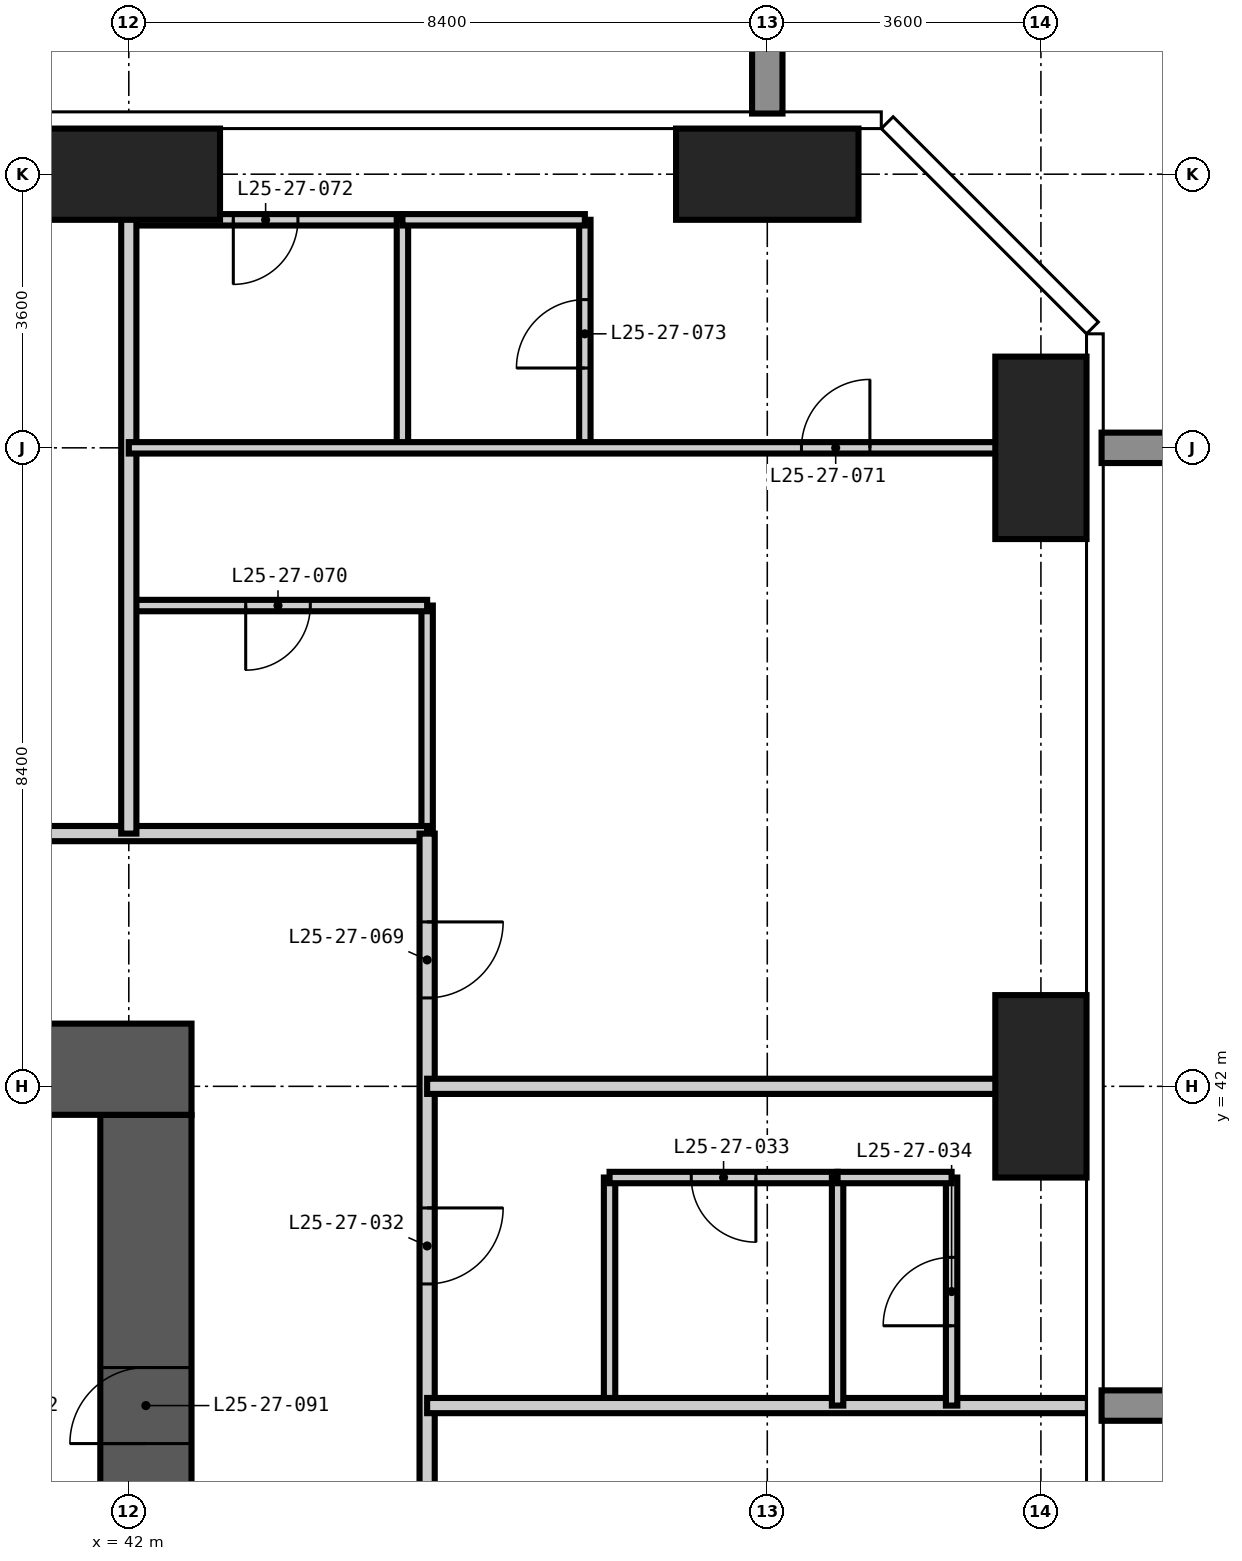
"""IFC4 building model, lengths in metres.
Left out: names, types, materials, properties, quantities, classifications, styles, units other than length and angle.
Written with IfcOpenShell. Run it as: python <this file> out.ifc"""

import sys

from ifc_helpers import new_model, si_unit, direction, frame, frame_2d, origin, origin_2d, place, context, subcontext, project, spatial, rectangle, extrude, element, fill, save


model = new_model("IFC4")
c1 = context("Model", 3, precision=1e-05, world=origin(), true_north=direction((0.0, 1.0)))
c2 = subcontext(c1, "Body", "Model", "MODEL_VIEW")
j1 = project(units=[si_unit("LENGTHUNIT", "METRE"), si_unit("PLANEANGLEUNIT", "RADIAN")], contexts=[c1])
p1 = place(None, origin())
s1 = spatial("IfcSite", under=j1, at=p1, CompositionType="ELEMENT")
p2 = place(p1, origin())
s2 = spatial("IfcBuilding", under=s1, at=p2, CompositionType="ELEMENT")
p3 = place(p2, frame((0.0, 0.0, 100.8)))
s3 = spatial("IfcBuildingStorey", under=s2, at=p3, CompositionType="ELEMENT", Elevation=100.8)
for number, where, z_axis, x_axis in (
    (1, (42.0, 54.0, -0.35), (0.0, 0.0, 1.0), (1.0, 0.0, 0.0)),
    (2, (50.4, 54.0, -0.35), (0.0, 0.0, 1.0), (1.0, 0.0, 0.0)),
):
    element("IfcColumn", number, at=place(p3, frame(where, z_axis=z_axis, x_axis=x_axis)), inside=s3, PredefinedType="COLUMN", context=c2, shape_type="SweptSolid", body=[
        extrude(rectangle(XDim=2.4, YDim=1.2, at=origin_2d()), origin(), (0.0, 0.0, 1.0), 3.6),
    ])
for number, where, z_axis, x_axis in (
    (3, (54.0, 42.0, -0.35), (0.0, 0.0, 1.0), (1.0, 0.0, 0.0)),
    (4, (54.0, 50.4, -0.35), (0.0, 0.0, 1.0), (1.0, 0.0, 0.0)),
):
    element("IfcColumn", number, at=place(p3, frame(where, z_axis=z_axis, x_axis=x_axis)), inside=s3, PredefinedType="COLUMN", context=c2, shape_type="SweptSolid", body=[
        extrude(rectangle(XDim=1.2, YDim=2.4, at=origin_2d()), origin(), (0.0, 0.0, 1.0), 3.6),
    ])
p4 = place(p3, frame((42.225, 17.175, -0.35), z_axis=(0.0, 0.0, 1.0), x_axis=(0.0, 1.0, 0.0)))
e5 = element("IfcWall", 5, at=p4, inside=s3, PredefinedType="SHEAR", context=c2, shape_type="SweptSolid", body=[
    extrude(rectangle(XDim=24.45, YDim=1.2, at=frame_2d((12.225, 0.0))), origin(), (0.0, 0.0, 1.0), 3.6),
])
p5 = place(p4, frame((0.425, 0.0, 0.35)))
e6 = element("IfcOpeningElement", 6, at=p5, cuts=e5, PredefinedType="OPENING", context=c2, shape_type="SweptSolid", body=[
    extrude(rectangle(XDim=1.2, YDim=2.2, at=frame_2d((0.6, 1.1))), frame((0.0, 0.61, 0.0), z_axis=(0.0, -1.0, 0.0), x_axis=(1.0, 0.0, 0.0)), (0.0, 0.0, 1.0), 1.22),
])
p6 = place(p4, frame((11.325, 0.0, 0.35)))
e7 = element("IfcOpeningElement", 7, at=p6, cuts=e5, PredefinedType="OPENING", context=c2, shape_type="SweptSolid", body=[
    extrude(rectangle(XDim=1.8, YDim=2.2, at=frame_2d((0.9, 1.1))), frame((0.0, 0.61, 0.0), z_axis=(0.0, -1.0, 0.0), x_axis=(1.0, 0.0, 0.0)), (0.0, 0.0, 1.0), 1.22),
])
p7 = place(p4, frame((20.125, 0.0, 0.35)))
e8 = element("IfcOpeningElement", 8, at=p7, cuts=e5, PredefinedType="OPENING", context=c2, shape_type="SweptSolid", body=[
    extrude(rectangle(XDim=1.0, YDim=2.1, at=frame_2d((0.5, 1.05))), frame((0.0, 0.61, 0.0), z_axis=(0.0, -1.0, 0.0), x_axis=(1.0, 0.0, 0.0)), (0.0, 0.0, 1.0), 1.22),
])
p8 = place(p3, frame((42.825, 42.225, -0.35), z_axis=(0.0, 0.0, 1.0), x_axis=(-1.0, 0.0, 0.0)))
e9 = element("IfcWall", 9, at=p8, inside=s3, PredefinedType="SHEAR", context=c2, shape_type="SweptSolid", body=[
    extrude(rectangle(XDim=26.85, YDim=1.2, at=frame_2d((13.425, 0.0))), origin(), (0.0, 0.0, 1.0), 3.6),
])
p9 = place(p8, frame((21.325, 0.0, 0.35)))
e10 = element("IfcOpeningElement", 10, at=p9, cuts=e9, PredefinedType="OPENING", context=c2, shape_type="SweptSolid", body=[
    extrude(rectangle(XDim=1.0, YDim=2.1, at=frame_2d((0.5, 1.05))), frame((0.0, 0.61, 0.0), z_axis=(0.0, -1.0, 0.0), x_axis=(1.0, 0.0, 0.0)), (0.0, 0.0, 1.0), 1.22),
])
p10 = place(p8, frame((10.725, 0.0, 0.35)))
e11 = element("IfcOpeningElement", 11, at=p10, cuts=e9, PredefinedType="OPENING", context=c2, shape_type="SweptSolid", body=[
    extrude(rectangle(XDim=1.2, YDim=2.2, at=frame_2d((0.6, 1.1))), frame((0.0, 0.61, 0.0), z_axis=(0.0, -1.0, 0.0), x_axis=(1.0, 0.0, 0.0)), (0.0, 0.0, 1.0), 1.22),
])
for number, where, z_axis, x_axis in (
    (12, (45.925, 45.325, 0.0), (0.0, 0.0, 1.0), (0.0, 1.0, 0.0)),
    (13, (48.325, 37.8, 0.0), (0.0, 0.0, 1.0), (0.0, 1.0, 0.0)),
):
    element("IfcWall", number, at=place(p3, frame(where, z_axis=z_axis, x_axis=x_axis)), inside=s3, PredefinedType="PARTITIONING", context=c2, shape_type="SweptSolid", body=[
        extrude(rectangle(XDim=3.0, YDim=0.15, at=frame_2d((1.5, 0.0))), origin(), (0.0, 0.0, 1.0), 3.25),
    ])
p11 = place(p3, frame((48.325, 40.8, 0.0), z_axis=(0.0, 0.0, 1.0), x_axis=(1.0, 0.0, 0.0)))
e14 = element("IfcWall", 14, at=p11, inside=s3, PredefinedType="PARTITIONING", context=c2, shape_type="SweptSolid", body=[
    extrude(rectangle(XDim=3.0, YDim=0.15, at=frame_2d((1.5, 0.0))), origin(), (0.0, 0.0, 1.0), 3.25),
])
p12 = place(p11, frame((1.075, 0.0, 0.0)))
e15 = element("IfcOpeningElement", 15, at=p12, cuts=e14, PredefinedType="OPENING", context=c2, shape_type="SweptSolid", body=[
    extrude(rectangle(XDim=0.85, YDim=2.1, at=frame_2d((0.425, 1.05))), frame((0.0, 0.085, 0.0), z_axis=(0.0, -1.0, 0.0), x_axis=(1.0, 0.0, 0.0)), (0.0, 0.0, 1.0), 0.17),
])
p13 = place(p3, frame((42.0, 48.325, 0.0), z_axis=(0.0, 0.0, 1.0), x_axis=(1.0, 0.0, 0.0)))
e16 = element("IfcWall", 16, at=p13, inside=s3, PredefinedType="PARTITIONING", context=c2, shape_type="SweptSolid", body=[
    extrude(rectangle(XDim=3.925, YDim=0.15, at=frame_2d((1.962, 0.0))), origin(), (0.0, 0.0, 1.0), 3.25),
])
p14 = place(p13, frame((1.538, 0.0, 0.0)))
e17 = element("IfcOpeningElement", 17, at=p14, cuts=e16, PredefinedType="OPENING", context=c2, shape_type="SweptSolid", body=[
    extrude(rectangle(XDim=0.85, YDim=2.1, at=frame_2d((0.425, 1.05))), frame((0.0, 0.085, 0.0), z_axis=(0.0, -1.0, 0.0), x_axis=(1.0, 0.0, 0.0)), (0.0, 0.0, 1.0), 0.17),
])
p15 = place(p3, frame((42.0, 53.4, 0.0), z_axis=(0.0, 0.0, 1.0), x_axis=(1.0, 0.0, 0.0)))
e18 = element("IfcWall", 18, at=p15, inside=s3, PredefinedType="PARTITIONING", context=c2, shape_type="SweptSolid", body=[
    extrude(rectangle(XDim=3.6, YDim=0.15, at=frame_2d((1.8, 0.0))), origin(), (0.0, 0.0, 1.0), 3.25),
])
p16 = place(p15, frame((1.375, 0.0, 0.0)))
e19 = element("IfcOpeningElement", 19, at=p16, cuts=e18, PredefinedType="OPENING", context=c2, shape_type="SweptSolid", body=[
    extrude(rectangle(XDim=0.85, YDim=2.1, at=frame_2d((0.425, 1.05))), frame((0.0, 0.085, 0.0), z_axis=(0.0, -1.0, 0.0), x_axis=(1.0, 0.0, 0.0)), (0.0, 0.0, 1.0), 0.17),
])
p17 = place(p3, frame((12.6, 45.325, 0.0), z_axis=(0.0, 0.0, 1.0), x_axis=(1.0, 0.0, 0.0)))
e20 = element("IfcWall", 20, at=p17, inside=s3, PredefinedType="PARTITIONING", context=c2, shape_type="SweptSolid", body=[
    extrude(rectangle(XDim=33.325, YDim=0.2, at=frame_2d((16.663, 0.0))), origin(), (0.0, 0.0, 1.0), 3.25),
])
p18 = place(p17, frame((7.9, 0.0, 0.0)))
e21 = element("IfcOpeningElement", 21, at=p18, cuts=e20, PredefinedType="OPENING", context=c2, shape_type="SweptSolid", body=[
    extrude(rectangle(XDim=1.0, YDim=2.2, at=frame_2d((0.5, 1.1))), frame((0.0, 0.11, 0.0), z_axis=(0.0, -1.0, 0.0), x_axis=(1.0, 0.0, 0.0)), (0.0, 0.0, 1.0), 0.22),
])
p19 = place(p17, frame((16.3, 0.0, 0.0)))
e22 = element("IfcOpeningElement", 22, at=p19, cuts=e20, PredefinedType="OPENING", context=c2, shape_type="SweptSolid", body=[
    extrude(rectangle(XDim=1.0, YDim=2.2, at=frame_2d((0.5, 1.1))), frame((0.0, 0.11, 0.0), z_axis=(0.0, -1.0, 0.0), x_axis=(1.0, 0.0, 0.0)), (0.0, 0.0, 1.0), 0.22),
])
p20 = place(p17, frame((24.7, 0.0, 0.0)))
e23 = element("IfcOpeningElement", 23, at=p20, cuts=e20, PredefinedType="OPENING", context=c2, shape_type="SweptSolid", body=[
    extrude(rectangle(XDim=1.0, YDim=2.2, at=frame_2d((0.5, 1.1))), frame((0.0, 0.11, 0.0), z_axis=(0.0, -1.0, 0.0), x_axis=(1.0, 0.0, 0.0)), (0.0, 0.0, 1.0), 0.22),
])
p21 = place(p3, frame((45.925, 45.325, 0.0), z_axis=(0.0, 0.0, 1.0), x_axis=(0.0, -1.0, 0.0)))
e24 = element("IfcWall", 24, at=p21, inside=s3, PredefinedType="PARTITIONING", context=c2, shape_type="SweptSolid", body=[
    extrude(rectangle(XDim=31.25, YDim=0.2, at=frame_2d((15.625, 0.0))), origin(), (0.0, 0.0, 1.0), 3.25),
])
p22 = place(p21, frame((25.925, 0.0, 0.0)))
e25 = element("IfcOpeningElement", 25, at=p22, cuts=e24, PredefinedType="OPENING", context=c2, shape_type="SweptSolid", body=[
    extrude(rectangle(XDim=1.0, YDim=2.2, at=frame_2d((0.5, 1.1))), frame((0.0, 0.11, 0.0), z_axis=(0.0, -1.0, 0.0), x_axis=(1.0, 0.0, 0.0)), (0.0, 0.0, 1.0), 0.22),
])
p23 = place(p21, frame((19.625, 0.0, 0.0)))
e26 = element("IfcOpeningElement", 26, at=p23, cuts=e24, PredefinedType="OPENING", context=c2, shape_type="SweptSolid", body=[
    extrude(rectangle(XDim=1.0, YDim=2.2, at=frame_2d((0.5, 1.1))), frame((0.0, 0.11, 0.0), z_axis=(0.0, -1.0, 0.0), x_axis=(1.0, 0.0, 0.0)), (0.0, 0.0, 1.0), 0.22),
])
p24 = place(p21, frame((11.225, 0.0, 0.0)))
e27 = element("IfcOpeningElement", 27, at=p24, cuts=e24, PredefinedType="OPENING", context=c2, shape_type="SweptSolid", body=[
    extrude(rectangle(XDim=1.0, YDim=2.2, at=frame_2d((0.5, 1.1))), frame((0.0, 0.11, 0.0), z_axis=(0.0, -1.0, 0.0), x_axis=(1.0, 0.0, 0.0)), (0.0, 0.0, 1.0), 0.22),
])
p25 = place(p21, frame((4.925, 0.0, 0.0)))
e28 = element("IfcOpeningElement", 28, at=p25, cuts=e24, PredefinedType="OPENING", context=c2, shape_type="SweptSolid", body=[
    extrude(rectangle(XDim=1.0, YDim=2.2, at=frame_2d((0.5, 1.1))), frame((0.0, 0.11, 0.0), z_axis=(0.0, -1.0, 0.0), x_axis=(1.0, 0.0, 0.0)), (0.0, 0.0, 1.0), 0.22),
])
p26 = place(p21, frame((29.387, 0.0, 0.0)))
e29 = element("IfcOpeningElement", 29, at=p26, cuts=e24, PredefinedType="OPENING", context=c2, shape_type="SweptSolid", body=[
    extrude(rectangle(XDim=1.0, YDim=2.2, at=frame_2d((0.5, 1.1))), frame((0.0, 0.11, 0.0), z_axis=(0.0, -1.0, 0.0), x_axis=(1.0, 0.0, 0.0)), (0.0, 0.0, 1.0), 0.22),
])
p27 = place(p21, frame((1.162, 0.0, 0.0)))
e30 = element("IfcOpeningElement", 30, at=p27, cuts=e24, PredefinedType="OPENING", context=c2, shape_type="SweptSolid", body=[
    extrude(rectangle(XDim=1.0, YDim=2.2, at=frame_2d((0.5, 1.1))), frame((0.0, 0.11, 0.0), z_axis=(0.0, -1.0, 0.0), x_axis=(1.0, 0.0, 0.0)), (0.0, 0.0, 1.0), 0.22),
])
p28 = place(p3, frame((42.0, 45.325, 0.0), z_axis=(0.0, 0.0, 1.0), x_axis=(0.0, 1.0, 0.0)))
e31 = element("IfcWall", 31, at=p28, inside=s3, PredefinedType="PARTITIONING", context=c2, shape_type="SweptSolid", body=[
    extrude(rectangle(XDim=9.293, YDim=0.2, at=frame_2d((4.646, 0.0))), origin(), (0.0, 0.0, 1.0), 3.25),
])
for number, where, z_axis, x_axis in (
    (32, (45.925, 37.8, 0.0), (0.0, 0.0, 1.0), (1.0, 0.0, 0.0)),
    (33, (45.925, 42.0, 0.0), (0.0, 0.0, 1.0), (1.0, 0.0, 0.0)),
):
    element("IfcWall", number, at=place(p3, frame(where, z_axis=z_axis, x_axis=x_axis)), inside=s3, PredefinedType="PARTITIONING", context=c2, shape_type="SweptSolid", body=[
        extrude(rectangle(XDim=8.693, YDim=0.2, at=frame_2d((4.346, 0.0))), origin(), (0.0, 0.0, 1.0), 3.25),
    ])
p29 = place(p3, frame((45.6, 50.4, 0.0), z_axis=(0.0, 0.0, 1.0), x_axis=(0.0, 1.0, 0.0)))
e34 = element("IfcWall", 34, at=p29, inside=s3, PredefinedType="PARTITIONING", context=c2, shape_type="SweptSolid", body=[
    extrude(rectangle(XDim=3.0, YDim=0.15, at=frame_2d((1.5, 0.0))), origin(), (0.0, 0.0, 1.0), 3.25),
])
p30 = place(p3, frame((48.0, 50.4, 0.0), z_axis=(0.0, 0.0, 1.0), x_axis=(0.0, 1.0, 0.0)))
e35 = element("IfcWall", 35, at=p30, inside=s3, PredefinedType="PARTITIONING", context=c2, shape_type="SweptSolid", body=[
    extrude(rectangle(XDim=3.0, YDim=0.15, at=frame_2d((1.5, 0.0))), origin(), (0.0, 0.0, 1.0), 3.25),
])
p31 = place(p30, frame((1.05, 0.0, 0.0)))
e36 = element("IfcOpeningElement", 36, at=p31, cuts=e35, PredefinedType="OPENING", context=c2, shape_type="SweptSolid", body=[
    extrude(rectangle(XDim=0.9, YDim=2.1, at=frame_2d((0.45, 1.05))), frame((0.0, 0.085, 0.0), z_axis=(0.0, -1.0, 0.0), x_axis=(1.0, 0.0, 0.0)), (0.0, 0.0, 1.0), 0.17),
])
p32 = place(p3, frame((51.325, 37.8, 0.0), z_axis=(0.0, 0.0, 1.0), x_axis=(0.0, 1.0, 0.0)))
e37 = element("IfcWall", 37, at=p32, inside=s3, PredefinedType="PARTITIONING", context=c2, shape_type="SweptSolid", body=[
    extrude(rectangle(XDim=3.0, YDim=0.15, at=frame_2d((1.5, 0.0))), origin(), (0.0, 0.0, 1.0), 3.25),
])
p33 = place(p3, frame((52.825, 37.8, 0.0), z_axis=(0.0, 0.0, 1.0), x_axis=(0.0, 1.0, 0.0)))
e38 = element("IfcWall", 38, at=p33, inside=s3, PredefinedType="PARTITIONING", context=c2, shape_type="SweptSolid", body=[
    extrude(rectangle(XDim=3.0, YDim=0.15, at=frame_2d((1.5, 0.0))), origin(), (0.0, 0.0, 1.0), 3.25),
])
p34 = place(p33, frame((1.05, 0.0, 0.0)))
e39 = element("IfcOpeningElement", 39, at=p34, cuts=e38, PredefinedType="OPENING", context=c2, shape_type="SweptSolid", body=[
    extrude(rectangle(XDim=0.9, YDim=2.1, at=frame_2d((0.45, 1.05))), frame((0.0, 0.085, 0.0), z_axis=(0.0, -1.0, 0.0), x_axis=(1.0, 0.0, 0.0)), (0.0, 0.0, 1.0), 0.17),
])
p35 = place(p3, frame((51.325, 40.8, 0.0), z_axis=(0.0, 0.0, 1.0), x_axis=(1.0, 0.0, 0.0)))
e40 = element("IfcWall", 40, at=p35, inside=s3, PredefinedType="PARTITIONING", context=c2, shape_type="SweptSolid", body=[
    extrude(rectangle(XDim=1.5, YDim=0.15, at=frame_2d((0.75, 0.0))), origin(), (0.0, 0.0, 1.0), 3.25),
])
p36 = place(p3, frame((42.0, 50.4, 0.0), z_axis=(0.0, 0.0, 1.0), x_axis=(1.0, 0.0, 0.0)))
e41 = element("IfcWall", 41, at=p36, inside=s3, PredefinedType="PARTITIONING", context=c2, shape_type="SweptSolid", body=[
    extrude(rectangle(XDim=12.618, YDim=0.15, at=frame_2d((6.309, 0.0))), origin(), (0.0, 0.0, 1.0), 3.25),
])
p37 = place(p36, frame((8.85, 0.0, 0.0)))
e42 = element("IfcOpeningElement", 42, at=p37, cuts=e41, PredefinedType="OPENING", context=c2, shape_type="SweptSolid", body=[
    extrude(rectangle(XDim=0.9, YDim=2.1, at=frame_2d((0.45, 1.05))), frame((0.0, 0.085, 0.0), z_axis=(0.0, -1.0, 0.0), x_axis=(1.0, 0.0, 0.0)), (0.0, 0.0, 1.0), 0.17),
])
p38 = place(p3, frame((45.6, 53.4, 0.0), z_axis=(0.0, 0.0, 1.0), x_axis=(1.0, 0.0, 0.0)))
e43 = element("IfcWall", 43, at=p38, inside=s3, PredefinedType="PARTITIONING", context=c2, shape_type="SweptSolid", body=[
    extrude(rectangle(XDim=2.4, YDim=0.15, at=frame_2d((1.2, 0.0))), origin(), (0.0, 0.0, 1.0), 3.25),
])
p39 = place(p25, origin())
e44 = element("IfcDoor", 44, at=p39, inside=s3, OperationType="SINGLE_SWING_LEFT", PredefinedType="DOOR", context=c2, shape_type="SweptSolid", body=[
    extrude(rectangle(XDim=1.0, YDim=2.2, at=frame_2d((0.5, 1.1))), frame((0.0, 0.025, 0.0), z_axis=(0.0, -1.0, 0.0), x_axis=(1.0, 0.0, 0.0)), (0.0, 0.0, 1.0), 0.05),
])
fill(e28, e44)
p40 = place(p12, frame((0.85, 0.0, 0.0), z_axis=(0.0, 0.0, 1.0), x_axis=(-1.0, 0.0, 0.0)))
e45 = element("IfcDoor", 45, at=p40, inside=s3, OperationType="SINGLE_SWING_LEFT", PredefinedType="DOOR", context=c2, shape_type="SweptSolid", body=[
    extrude(rectangle(XDim=0.85, YDim=2.1, at=frame_2d((0.425, 1.05))), frame((0.0, 0.025, 0.0), z_axis=(0.0, -1.0, 0.0), x_axis=(1.0, 0.0, 0.0)), (0.0, 0.0, 1.0), 0.05),
])
fill(e15, e45)
p41 = place(p34, origin())
e46 = element("IfcDoor", 46, at=p41, inside=s3, OperationType="SINGLE_SWING_LEFT", PredefinedType="DOOR", context=c2, shape_type="SweptSolid", body=[
    extrude(rectangle(XDim=0.9, YDim=2.1, at=frame_2d((0.45, 1.05))), frame((0.0, 0.025, 0.0), z_axis=(0.0, -1.0, 0.0), x_axis=(1.0, 0.0, 0.0)), (0.0, 0.0, 1.0), 0.05),
])
fill(e39, e46)
p42 = place(p27, origin())
e47 = element("IfcDoor", 47, at=p42, inside=s3, OperationType="SINGLE_SWING_LEFT", PredefinedType="DOOR", context=c2, shape_type="SweptSolid", body=[
    extrude(rectangle(XDim=1.0, YDim=2.2, at=frame_2d((0.5, 1.1))), frame((0.0, 0.025, 0.0), z_axis=(0.0, -1.0, 0.0), x_axis=(1.0, 0.0, 0.0)), (0.0, 0.0, 1.0), 0.05),
])
fill(e30, e47)
p43 = place(p14, frame((0.85, 0.0, 0.0), z_axis=(0.0, 0.0, 1.0), x_axis=(-1.0, 0.0, 0.0)))
e48 = element("IfcDoor", 48, at=p43, inside=s3, OperationType="SINGLE_SWING_RIGHT", PredefinedType="DOOR", context=c2, shape_type="SweptSolid", body=[
    extrude(rectangle(XDim=0.85, YDim=2.1, at=frame_2d((0.425, 1.05))), frame((0.0, 0.025, 0.0), z_axis=(0.0, -1.0, 0.0), x_axis=(1.0, 0.0, 0.0)), (0.0, 0.0, 1.0), 0.05),
])
fill(e17, e48)
p44 = place(p37, origin())
e49 = element("IfcDoor", 49, at=p44, inside=s3, OperationType="SINGLE_SWING_RIGHT", PredefinedType="DOOR", context=c2, shape_type="SweptSolid", body=[
    extrude(rectangle(XDim=0.9, YDim=2.1, at=frame_2d((0.45, 1.05))), frame((0.0, 0.025, 0.0), z_axis=(0.0, -1.0, 0.0), x_axis=(1.0, 0.0, 0.0)), (0.0, 0.0, 1.0), 0.05),
])
fill(e42, e49)
p45 = place(p16, frame((0.85, 0.0, 0.0), z_axis=(0.0, 0.0, 1.0), x_axis=(-1.0, 0.0, 0.0)))
e50 = element("IfcDoor", 50, at=p45, inside=s3, OperationType="SINGLE_SWING_RIGHT", PredefinedType="DOOR", context=c2, shape_type="SweptSolid", body=[
    extrude(rectangle(XDim=0.85, YDim=2.1, at=frame_2d((0.425, 1.05))), frame((0.0, 0.025, 0.0), z_axis=(0.0, -1.0, 0.0), x_axis=(1.0, 0.0, 0.0)), (0.0, 0.0, 1.0), 0.05),
])
fill(e19, e50)
p46 = place(p31, origin())
e51 = element("IfcDoor", 51, at=p46, inside=s3, OperationType="SINGLE_SWING_LEFT", PredefinedType="DOOR", context=c2, shape_type="SweptSolid", body=[
    extrude(rectangle(XDim=0.9, YDim=2.1, at=frame_2d((0.45, 1.05))), frame((0.0, 0.025, 0.0), z_axis=(0.0, -1.0, 0.0), x_axis=(1.0, 0.0, 0.0)), (0.0, 0.0, 1.0), 0.05),
])
fill(e36, e51)
p47 = place(p7, origin())
e52 = element("IfcDoor", 52, at=p47, inside=s3, OperationType="SINGLE_SWING_LEFT", PredefinedType="DOOR", context=c2, shape_type="SweptSolid", body=[
    extrude(rectangle(XDim=1.0, YDim=2.1, at=frame_2d((0.5, 1.05))), frame((0.0, 0.025, 0.0), z_axis=(0.0, -1.0, 0.0), x_axis=(1.0, 0.0, 0.0)), (0.0, 0.0, 1.0), 0.05),
])
fill(e8, e52)
save(model, sys.argv[1])
